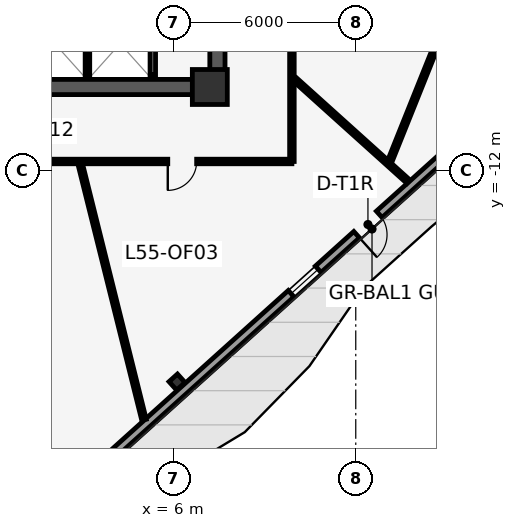
"""IFC4 building model, lengths in metres.
Left out: names, types, materials, properties, quantities, classifications, styles, units other than length and angle.
Written with IfcOpenShell. Run it as: python <this file> out.ifc"""

import sys

from ifc_helpers import new_model, si_unit, direction, frame, frame_2d, origin, origin_2d, place, context, subcontext, project, spatial, rectangle, i_section, extrude, element, fill, save


model = new_model("IFC4")
c1 = context("Model", 3, precision=1e-05, world=origin(), true_north=direction((0.0, 1.0)))
c2 = subcontext(c1, "Body", "Model", "MODEL_VIEW")
j1 = project(units=[si_unit("LENGTHUNIT", "METRE"), si_unit("PLANEANGLEUNIT", "RADIAN")], contexts=[c1])
p1 = place(None, origin())
s1 = spatial("IfcSite", under=j1, at=p1, CompositionType="ELEMENT")
p2 = place(p1, origin())
s2 = spatial("IfcBuilding", under=s1, at=p2, CompositionType="ELEMENT")
p3 = place(p2, frame((0.0, 0.0, 236.3)))
s3 = spatial("IfcBuildingStorey", under=s2, at=p3, CompositionType="ELEMENT", Elevation=236.3)
p4 = place(p3, frame((7.45, -9.0, 0.0), z_axis=(0.0, 0.0, 1.0), x_axis=(0.0, 1.0, 0.0)))
e1 = element("IfcWall", 1, at=p4, inside=s3, PredefinedType="SHEAR", context=c2, shape_type="SweptSolid", body=[
    extrude(rectangle(XDim=9.1, YDim=0.5, at=frame_2d((4.55, 0.0))), origin(), (0.0, 0.0, 1.0), 3.85),
])
p5 = place(p4, frame((2.64, 0.0, 0.0)))
e2 = element("IfcOpeningElement", 2, at=p5, cuts=e1, PredefinedType="OPENING", context=c2, shape_type="SweptSolid", body=[
    extrude(rectangle(XDim=1.8, YDim=2.2, at=frame_2d((0.9, 1.1))), frame((0.0, 0.26, 0.0), z_axis=(0.0, -1.0, 0.0), x_axis=(1.0, 0.0, 0.0)), (0.0, 0.0, 1.0), 0.52),
])
p6 = place(p4, frame((7.55, 0.0, 0.0)))
e3 = element("IfcOpeningElement", 3, at=p6, cuts=e1, PredefinedType="OPENING", context=c2, shape_type="SweptSolid", body=[
    extrude(rectangle(XDim=1.2, YDim=2.15, at=frame_2d((0.6, 1.075))), frame((0.0, 0.26, 0.0), z_axis=(0.0, -1.0, 0.0), x_axis=(1.0, 0.0, 0.0)), (0.0, 0.0, 1.0), 0.52),
])
p7 = place(p3, frame((-7.45, -9.25, 0.0), z_axis=(0.0, 0.0, 1.0), x_axis=(1.0, 0.0, 0.0)))
e4 = element("IfcWall", 4, at=p7, inside=s3, PredefinedType="SHEAR", context=c2, shape_type="SweptSolid", body=[
    extrude(rectangle(XDim=14.9, YDim=0.5, at=frame_2d((7.45, 0.0))), origin(), (0.0, 0.0, 1.0), 3.85),
])
p8 = place(p3, frame((7.2, -9.25, 0.0), z_axis=(0.0, 0.0, 1.0), x_axis=(1.0, 0.0, 0.0)))
e5 = element("IfcColumn", 5, at=p8, inside=s3, PredefinedType="COLUMN", context=c2, shape_type="SweptSolid", body=[
    extrude(rectangle(XDim=1.15, YDim=1.15, at=origin_2d()), origin(), (0.0, 0.0, 1.0), 4.1),
])
p9 = place(p3, frame((6.122, -18.955, 0.0), z_axis=(0.0, 0.0, 1.0), x_axis=(0.743144825477, 0.669130606359, 0.0)))
e6 = element("IfcColumn", 6, at=p9, inside=s3, PredefinedType="COLUMN", context=c2, shape_type="SweptSolid", body=[
    extrude(i_section(OverallWidth=0.373, OverallDepth=0.373, WebThickness=0.016, FlangeThickness=0.026, at=origin_2d()), origin(), (0.0, 0.0, 1.0), 4.1),
])
p10 = place(p3, frame((30.935, 2.916, 0.0), z_axis=(0.0, 0.0, 1.0), x_axis=(-0.743143233829, -0.66913237406, 0.0)))
e7 = element("IfcWall", 7, at=p10, inside=s3, PredefinedType="STANDARD", context=c2, shape_type="SweptSolid", body=[
    extrude(rectangle(XDim=49.88, YDim=0.28, at=frame_2d((24.94, 0.0))), origin(), (0.0, 0.0, 1.0), 3.85),
])
p11 = place(p10, frame((24.44, 0.0, 0.0)))
e8 = element("IfcOpeningElement", 8, at=p11, cuts=e7, PredefinedType="OPENING", context=c2, shape_type="SweptSolid", body=[
    extrude(rectangle(XDim=1.0, YDim=2.15, at=frame_2d((0.5, 1.075))), frame((0.0, 0.15, 0.0), z_axis=(0.0, -1.0, 0.0), x_axis=(1.0, 0.0, 0.0)), (0.0, 0.0, 1.0), 0.3),
])
p12 = place(p10, frame((4.74, 0.0, 0.85)))
e9 = element("IfcOpeningElement", 9, at=p12, cuts=e7, PredefinedType="OPENING", context=c2, shape_type="SweptSolid", body=[
    extrude(rectangle(XDim=1.2, YDim=2.2, at=frame_2d((0.6, 1.1))), frame((0.0, 0.15, 0.0), z_axis=(0.0, -1.0, 0.0), x_axis=(1.0, 0.0, 0.0)), (0.0, 0.0, 1.0), 0.3),
])
p13 = place(p10, frame((10.34, 0.0, 0.85)))
e10 = element("IfcOpeningElement", 10, at=p13, cuts=e7, PredefinedType="OPENING", context=c2, shape_type="SweptSolid", body=[
    extrude(rectangle(XDim=1.2, YDim=2.2, at=frame_2d((0.6, 1.1))), frame((0.0, 0.15, 0.0), z_axis=(0.0, -1.0, 0.0), x_axis=(1.0, 0.0, 0.0)), (0.0, 0.0, 1.0), 0.3),
])
p14 = place(p10, frame((27.14, 0.0, 0.85)))
e11 = element("IfcOpeningElement", 11, at=p14, cuts=e7, PredefinedType="OPENING", context=c2, shape_type="SweptSolid", body=[
    extrude(rectangle(XDim=1.2, YDim=2.2, at=frame_2d((0.6, 1.1))), frame((0.0, 0.15, 0.0), z_axis=(0.0, -1.0, 0.0), x_axis=(1.0, 0.0, 0.0)), (0.0, 0.0, 1.0), 0.3),
])
p15 = place(p10, frame((38.34, 0.0, 0.85)))
e12 = element("IfcOpeningElement", 12, at=p15, cuts=e7, PredefinedType="OPENING", context=c2, shape_type="SweptSolid", body=[
    extrude(rectangle(XDim=1.2, YDim=2.2, at=frame_2d((0.6, 1.1))), frame((0.0, 0.15, 0.0), z_axis=(0.0, -1.0, 0.0), x_axis=(1.0, 0.0, 0.0)), (0.0, 0.0, 1.0), 0.3),
])
p16 = place(p10, frame((43.94, 0.0, 0.85)))
e13 = element("IfcOpeningElement", 13, at=p16, cuts=e7, PredefinedType="OPENING", context=c2, shape_type="SweptSolid", body=[
    extrude(rectangle(XDim=1.2, YDim=2.2, at=frame_2d((0.6, 1.1))), frame((0.0, 0.15, 0.0), z_axis=(0.0, -1.0, 0.0), x_axis=(1.0, 0.0, 0.0)), (0.0, 0.0, 1.0), 0.3),
])
p17 = place(p3, frame((3.175, -8.85, 0.0), z_axis=(0.0, 0.0, 1.0), x_axis=(0.0, 1.0, 0.0)))
e14 = element("IfcWall", 14, at=p17, inside=s3, PredefinedType="PARTITIONING", context=c2, shape_type="SweptSolid", body=[
    extrude(rectangle(XDim=2.08, YDim=0.15, at=frame_2d((1.04, 0.0))), origin(), (0.0, 0.0, 1.0), 3.85),
])
p18 = place(p3, frame((5.325, -8.85, 0.0), z_axis=(0.0, 0.0, 1.0), x_axis=(0.0, 1.0, 0.0)))
e15 = element("IfcWall", 15, at=p18, inside=s3, PredefinedType="PARTITIONING", context=c2, shape_type="SweptSolid", body=[
    extrude(rectangle(XDim=2.08, YDim=0.18, at=frame_2d((1.04, 0.0))), origin(), (0.0, 0.0, 1.0), 3.85),
])
p19 = place(p3, frame((9.9, 11.85, 0.0), z_axis=(0.0, 0.0, 1.0), x_axis=(0.0, -1.0, 0.0)))
e16 = element("IfcWall", 16, at=p19, inside=s3, PredefinedType="PARTITIONING", context=c2, shape_type="SweptSolid", body=[
    extrude(rectangle(XDim=23.55, YDim=0.15, at=frame_2d((11.775, 0.0))), origin(), (0.0, 0.0, 1.0), 3.85),
])
p20 = place(p19, frame((16.585, 0.0, 0.0)))
e17 = element("IfcOpeningElement", 17, at=p20, cuts=e16, PredefinedType="OPENING", context=c2, shape_type="SweptSolid", body=[
    extrude(rectangle(XDim=0.95, YDim=2.15, at=frame_2d((0.475, 1.075))), frame((0.0, 0.085, 0.0), z_axis=(0.0, -1.0, 0.0), x_axis=(1.0, 0.0, 0.0)), (0.0, 0.0, 1.0), 0.17),
])
p21 = place(p19, frame((9.642, 0.0, 0.0)))
e18 = element("IfcOpeningElement", 18, at=p21, cuts=e16, PredefinedType="OPENING", context=c2, shape_type="SweptSolid", body=[
    extrude(rectangle(XDim=0.95, YDim=2.15, at=frame_2d((0.475, 1.075))), frame((0.0, 0.085, 0.0), z_axis=(0.0, -1.0, 0.0), x_axis=(1.0, 0.0, 0.0)), (0.0, 0.0, 1.0), 0.17),
])
p22 = place(p19, frame((3.14, 0.0, 0.0)))
e19 = element("IfcOpeningElement", 19, at=p22, cuts=e16, PredefinedType="OPENING", context=c2, shape_type="SweptSolid", body=[
    extrude(rectangle(XDim=0.95, YDim=2.15, at=frame_2d((0.475, 1.075))), frame((0.0, 0.085, 0.0), z_axis=(0.0, -1.0, 0.0), x_axis=(1.0, 0.0, 0.0)), (0.0, 0.0, 1.0), 0.17),
])
p23 = place(p3, frame((9.9, -11.7, 0.0), z_axis=(0.0, 0.0, 1.0), x_axis=(-1.0, 0.0, 0.0)))
e20 = element("IfcWall", 20, at=p23, inside=s3, PredefinedType="PARTITIONING", context=c2, shape_type="SweptSolid", body=[
    extrude(rectangle(XDim=12.12, YDim=0.15, at=frame_2d((6.06, 0.0))), origin(), (0.0, 0.0, 1.0), 3.85),
])
p24 = place(p23, frame((3.133, 0.0, 0.0)))
e21 = element("IfcOpeningElement", 21, at=p24, cuts=e20, PredefinedType="OPENING", context=c2, shape_type="SweptSolid", body=[
    extrude(rectangle(XDim=0.95, YDim=2.15, at=frame_2d((0.475, 1.075))), frame((0.0, 0.085, 0.0), z_axis=(0.0, -1.0, 0.0), x_axis=(1.0, 0.0, 0.0)), (0.0, 0.0, 1.0), 0.17),
])
p25 = place(p3, frame((2.943, -11.805, 0.0), z_axis=(0.0, 0.0, 1.0), x_axis=(0.241924425986, -0.970295095376, 0.0)))
e22 = element("IfcWall", 22, at=p25, inside=s3, PredefinedType="PARTITIONING", context=c2, shape_type="SweptSolid", body=[
    extrude(rectangle(XDim=8.647, YDim=0.15, at=frame_2d((4.324, 0.0))), origin(), (0.0, 0.0, 1.0), 3.85),
])
p26 = place(p3, frame((10.005, -9.009, 0.0), z_axis=(0.0, 0.0, 1.0), x_axis=(0.743153755308, -0.669120688644, 0.0)))
e23 = element("IfcWall", 23, at=p26, inside=s3, PredefinedType="PARTITIONING", context=c2, shape_type="SweptSolid", body=[
    extrude(rectangle(XDim=5.016, YDim=0.15, at=frame_2d((2.508, 0.0))), origin(), (0.0, 0.0, 1.0), 3.85),
])
p27 = place(p3, frame((13.094, -11.756, 0.0), z_axis=(0.0, 0.0, 1.0), x_axis=(0.372320948008, 0.928104041406, 0.0)))
e24 = element("IfcWall", 24, at=p27, inside=s3, PredefinedType="PARTITIONING", context=c2, shape_type="SweptSolid", body=[
    extrude(rectangle(XDim=10.088, YDim=0.15, at=frame_2d((5.044, 0.0))), origin(), (0.0, 0.0, 1.0), 3.85),
])
p28 = place(p27, frame((4.594, 0.0, 0.0)))
e25 = element("IfcOpeningElement", 25, at=p28, cuts=e24, PredefinedType="OPENING", context=c2, shape_type="SweptSolid", body=[
    extrude(rectangle(XDim=0.9, YDim=2.1, at=frame_2d((0.45, 1.05))), frame((0.0, 0.085, 0.0), z_axis=(0.0, -1.0, 0.0), x_axis=(1.0, 0.0, 0.0)), (0.0, 0.0, 1.0), 0.17),
])
p29 = place(p11, origin())
e26 = element("IfcDoor", 26, at=p29, inside=s3, OperationType="SINGLE_SWING_RIGHT", PredefinedType="DOOR", context=c2, shape_type="SweptSolid", body=[
    extrude(rectangle(XDim=1.0, YDim=2.15, at=frame_2d((0.5, 1.075))), frame((0.0, 0.025, 0.0), z_axis=(0.0, -1.0, 0.0), x_axis=(1.0, 0.0, 0.0)), (0.0, 0.0, 1.0), 0.05),
])
fill(e8, e26)
p30 = place(p14, origin())
e27 = element("IfcWindow", 27, at=p30, inside=s3, PartitioningType="SINGLE_PANEL", PredefinedType="WINDOW", context=c2, shape_type="SweptSolid", body=[
    extrude(rectangle(XDim=1.2, YDim=2.2, at=frame_2d((0.6, 1.1))), frame((0.0, 0.03, 0.0), z_axis=(0.0, -1.0, 0.0), x_axis=(1.0, 0.0, 0.0)), (0.0, 0.0, 1.0), 0.06),
])
fill(e11, e27)
p31 = place(p24, origin())
e28 = element("IfcDoor", 28, at=p31, inside=s3, OperationType="SINGLE_SWING_RIGHT", PredefinedType="DOOR", context=c2, shape_type="SweptSolid", body=[
    extrude(rectangle(XDim=0.95, YDim=2.15, at=frame_2d((0.475, 1.075))), frame((0.0, 0.025, 0.0), z_axis=(0.0, -1.0, 0.0), x_axis=(1.0, 0.0, 0.0)), (0.0, 0.0, 1.0), 0.05),
])
fill(e21, e28)
save(model, sys.argv[1])
